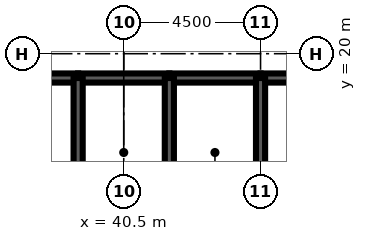
"""IFC4 building model, lengths in metres.
Left out: names, types, materials, properties, quantities, classifications, styles, units other than length and angle.
Written with IfcOpenShell. Run it as: python <this file> out.ifc"""

import sys

from ifc_helpers import new_model, si_unit, direction, frame, frame_2d, origin, place, context, subcontext, project, spatial, rectangle, extrude, element, fill, save


model = new_model("IFC4")
c1 = context("Model", 3, precision=1e-05, world=origin(), true_north=direction((0.0, 1.0)))
c2 = subcontext(c1, "Body", "Model", "MODEL_VIEW")
j1 = project(units=[si_unit("LENGTHUNIT", "METRE"), si_unit("PLANEANGLEUNIT", "RADIAN")], contexts=[c1])
p1 = place(None, origin())
s1 = spatial("IfcSite", under=j1, at=p1, CompositionType="ELEMENT")
p2 = place(p1, origin())
s2 = spatial("IfcBuilding", under=s1, at=p2, CompositionType="ELEMENT")
p3 = place(p2, frame((0.0, 0.0, 296.3)))
s3 = spatial("IfcBuildingStorey", under=s2, at=p3, CompositionType="ELEMENT", Elevation=296.3)
p4 = place(p3, frame((36.0, 19.2, 0.0), z_axis=(0.0, 0.0, 1.0), x_axis=(1.0, 0.0, 0.0)))
e1 = element("IfcWall", 1, at=p4, inside=s3, PredefinedType="SOLIDWALL", context=c2, shape_type="SweptSolid", body=[
    extrude(rectangle(XDim=3.0, YDim=0.3, at=frame_2d((1.5, 0.0))), origin(), (0.0, 0.0, 1.0), 4.2),
])
p5 = place(p4, frame((0.95, 0.0, 0.0)))
e2 = element("IfcOpeningElement", 2, at=p5, cuts=e1, PredefinedType="OPENING", context=c2, shape_type="SweptSolid", body=[
    extrude(rectangle(XDim=1.1, YDim=2.2, at=frame_2d((0.55, 1.1))), frame((0.0, 0.16, 0.0), z_axis=(0.0, -1.0, 0.0), x_axis=(1.0, 0.0, 0.0)), (0.0, 0.0, 1.0), 0.32),
])
p6 = place(p3, frame((39.0, 19.2, 0.0), z_axis=(0.0, 0.0, 1.0), x_axis=(1.0, 0.0, 0.0)))
e3 = element("IfcWall", 3, at=p6, inside=s3, PredefinedType="SOLIDWALL", context=c2, shape_type="SweptSolid", body=[
    extrude(rectangle(XDim=3.0, YDim=0.3, at=frame_2d((1.5, 0.0))), origin(), (0.0, 0.0, 1.0), 4.2),
])
p7 = place(p6, frame((1.0, 0.0, 0.0)))
e4 = element("IfcOpeningElement", 4, at=p7, cuts=e3, PredefinedType="OPENING", context=c2, shape_type="SweptSolid", body=[
    extrude(rectangle(XDim=1.0, YDim=2.1, at=frame_2d((0.5, 1.05))), frame((0.0, 0.16, 0.0), z_axis=(0.0, -1.0, 0.0), x_axis=(1.0, 0.0, 0.0)), (0.0, 0.0, 1.0), 0.32),
])
p8 = place(p3, frame((42.0, 19.2, 0.0), z_axis=(0.0, 0.0, 1.0), x_axis=(1.0, 0.0, 0.0)))
e5 = element("IfcWall", 5, at=p8, inside=s3, PredefinedType="SOLIDWALL", context=c2, shape_type="SweptSolid", body=[
    extrude(rectangle(XDim=3.0, YDim=0.3, at=frame_2d((1.5, 0.0))), origin(), (0.0, 0.0, 1.0), 4.2),
])
p9 = place(p8, frame((1.0, 0.0, 0.0)))
e6 = element("IfcOpeningElement", 6, at=p9, cuts=e5, PredefinedType="OPENING", context=c2, shape_type="SweptSolid", body=[
    extrude(rectangle(XDim=1.0, YDim=2.1, at=frame_2d((0.5, 1.05))), frame((0.0, 0.16, 0.0), z_axis=(0.0, -1.0, 0.0), x_axis=(1.0, 0.0, 0.0)), (0.0, 0.0, 1.0), 0.32),
])
p10 = place(p3, frame((45.0, 19.2, 0.0), z_axis=(0.0, 0.0, 1.0), x_axis=(1.0, 0.0, 0.0)))
e7 = element("IfcWall", 7, at=p10, inside=s3, PredefinedType="SOLIDWALL", context=c2, shape_type="SweptSolid", body=[
    extrude(rectangle(XDim=9.0, YDim=0.3, at=frame_2d((4.5, 0.0))), origin(), (0.0, 0.0, 1.0), 4.2),
])
p11 = place(p10, frame((7.35, 0.0, 0.0)))
e8 = element("IfcOpeningElement", 8, at=p11, cuts=e7, PredefinedType="OPENING", context=c2, shape_type="SweptSolid", body=[
    extrude(rectangle(XDim=1.0, YDim=2.1, at=frame_2d((0.5, 1.05))), frame((0.0, 0.16, 0.0), z_axis=(0.0, -1.0, 0.0), x_axis=(1.0, 0.0, 0.0)), (0.0, 0.0, 1.0), 0.32),
])
for number, where, z_axis, x_axis in (
    (9, (39.0, 16.0, 0.0), (0.0, 0.0, 1.0), (0.0, 1.0, 0.0)),
    (10, (42.0, 16.0, 0.0), (0.0, 0.0, 1.0), (0.0, 1.0, 0.0)),
    (11, (45.0, 16.0, 0.0), (0.0, 0.0, 1.0), (0.0, 1.0, 0.0)),
):
    element("IfcWall", number, at=place(p3, frame(where, z_axis=z_axis, x_axis=x_axis)), inside=s3, PredefinedType="SOLIDWALL", context=c2, shape_type="SweptSolid", body=[
        extrude(rectangle(XDim=3.2, YDim=0.3, at=frame_2d((1.6, 0.0))), origin(), (0.0, 0.0, 1.0), 4.2),
    ])
p12 = place(p3, frame((39.15, 17.3, 0.0), z_axis=(0.0, 0.0, 1.0), x_axis=(1.0, 0.0, 0.0)))
e12 = element("IfcWall", 12, at=p12, inside=s3, PredefinedType="SOLIDWALL", context=c2, shape_type="SweptSolid", body=[
    extrude(rectangle(XDim=2.7, YDim=0.3, at=frame_2d((1.35, 0.0))), origin(), (0.0, 0.0, 1.0), 4.04),
])
p13 = place(p12, frame((0.85, 0.0, 0.0)))
e13 = element("IfcOpeningElement", 13, at=p13, cuts=e12, PredefinedType="OPENING", context=c2, shape_type="SweptSolid", body=[
    extrude(rectangle(XDim=1.0, YDim=2.1, at=frame_2d((0.5, 1.05))), frame((0.0, 0.16, 0.0), z_axis=(0.0, -1.0, 0.0), x_axis=(1.0, 0.0, 0.0)), (0.0, 0.0, 1.0), 0.32),
])
p14 = place(p3, frame((42.15, 17.3, 0.0), z_axis=(0.0, 0.0, 1.0), x_axis=(1.0, 0.0, 0.0)))
e14 = element("IfcWall", 14, at=p14, inside=s3, PredefinedType="SOLIDWALL", context=c2, shape_type="SweptSolid", body=[
    extrude(rectangle(XDim=2.7, YDim=0.3, at=frame_2d((1.35, 0.0))), origin(), (0.0, 0.0, 1.0), 4.04),
])
p15 = place(p14, frame((0.85, 0.0, 0.0)))
e15 = element("IfcOpeningElement", 15, at=p15, cuts=e14, PredefinedType="OPENING", context=c2, shape_type="SweptSolid", body=[
    extrude(rectangle(XDim=1.0, YDim=2.1, at=frame_2d((0.5, 1.05))), frame((0.0, 0.16, 0.0), z_axis=(0.0, -1.0, 0.0), x_axis=(1.0, 0.0, 0.0)), (0.0, 0.0, 1.0), 0.32),
])
p16 = place(p13, origin())
e16 = element("IfcDoor", 16, at=p16, inside=s3, OperationType="SINGLE_SWING_LEFT", PredefinedType="DOOR", context=c2, shape_type="SweptSolid", body=[
    extrude(rectangle(XDim=1.0, YDim=2.1, at=frame_2d((0.5, 1.05))), frame((0.0, 0.025, 0.0), z_axis=(0.0, -1.0, 0.0), x_axis=(1.0, 0.0, 0.0)), (0.0, 0.0, 1.0), 0.05),
])
fill(e13, e16)
p17 = place(p15, origin())
e17 = element("IfcDoor", 17, at=p17, inside=s3, OperationType="SINGLE_SWING_LEFT", PredefinedType="DOOR", context=c2, shape_type="SweptSolid", body=[
    extrude(rectangle(XDim=1.0, YDim=2.1, at=frame_2d((0.5, 1.05))), frame((0.0, 0.025, 0.0), z_axis=(0.0, -1.0, 0.0), x_axis=(1.0, 0.0, 0.0)), (0.0, 0.0, 1.0), 0.05),
])
fill(e15, e17)
p18 = place(p7, origin())
e18 = element("IfcDoor", 18, at=p18, inside=s3, OperationType="SINGLE_SWING_LEFT", PredefinedType="DOOR", context=c2, shape_type="SweptSolid", body=[
    extrude(rectangle(XDim=1.0, YDim=2.1, at=frame_2d((0.5, 1.05))), frame((0.0, 0.025, 0.0), z_axis=(0.0, -1.0, 0.0), x_axis=(1.0, 0.0, 0.0)), (0.0, 0.0, 1.0), 0.05),
])
fill(e4, e18)
p19 = place(p9, origin())
e19 = element("IfcDoor", 19, at=p19, inside=s3, OperationType="SINGLE_SWING_LEFT", PredefinedType="DOOR", context=c2, shape_type="SweptSolid", body=[
    extrude(rectangle(XDim=1.0, YDim=2.1, at=frame_2d((0.5, 1.05))), frame((0.0, 0.025, 0.0), z_axis=(0.0, -1.0, 0.0), x_axis=(1.0, 0.0, 0.0)), (0.0, 0.0, 1.0), 0.05),
])
fill(e6, e19)
save(model, sys.argv[1])
